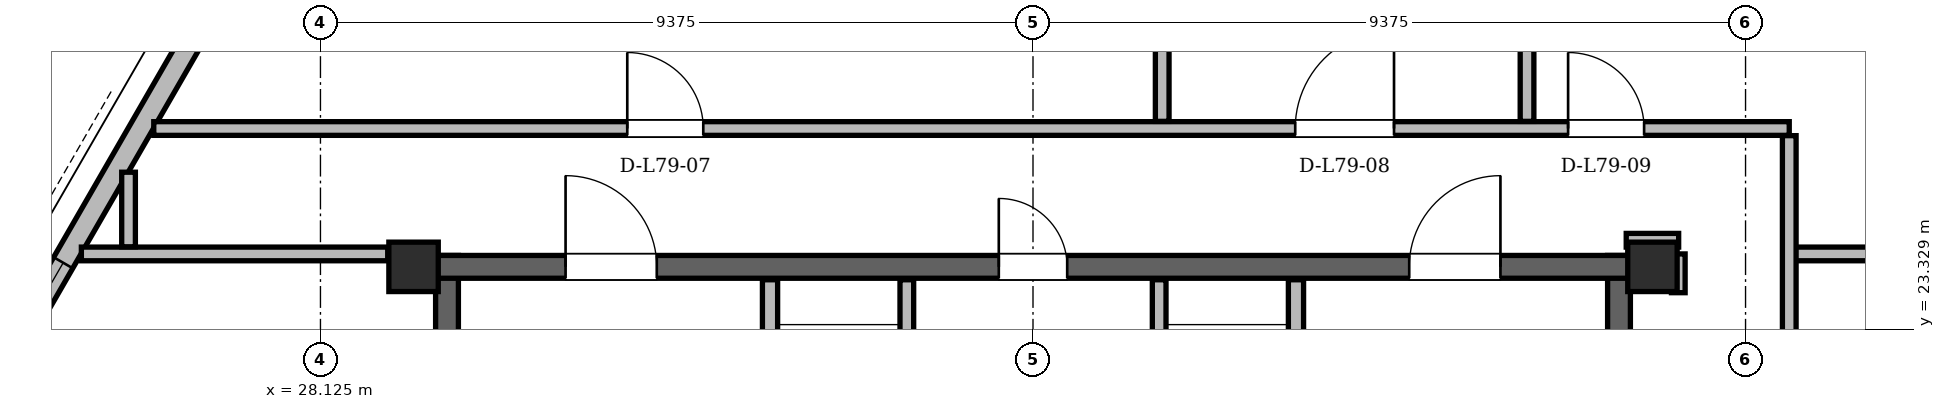
"""IFC4 building model, lengths in metres.
Left out: names, types, materials, properties, quantities, classifications, styles, units other than length and angle.
Written with IfcOpenShell. Run it as: python <this file> out.ifc"""

import sys

from ifc_helpers import new_model, si_unit, direction, frame, frame_2d, origin, origin_2d, place, context, subcontext, project, spatial, rectangle, hollow_rectangle, extrude, element, fill, save


model = new_model("IFC4")
c1 = context("Model", 3, precision=1e-05, world=origin(), true_north=direction((0.0, 1.0)))
c2 = subcontext(c1, "Body", "Model", "MODEL_VIEW")
j1 = project(units=[si_unit("LENGTHUNIT", "METRE"), si_unit("PLANEANGLEUNIT", "RADIAN")], contexts=[c1])
p1 = place(None, origin())
s1 = spatial("IfcSite", under=j1, at=p1, CompositionType="ELEMENT")
p2 = place(p1, origin())
s2 = spatial("IfcBuilding", under=s1, at=p2, CompositionType="ELEMENT")
p3 = place(p2, frame((0.0, 0.0, 301.2)))
s3 = spatial("IfcBuildingStorey", under=s2, at=p3, CompositionType="ELEMENT", Elevation=301.2)
for number, where, z_axis, x_axis in (
    (1, (45.65, 24.15, 0.0), (0.0, 0.0, 1.0), (1.0, 0.0, 0.0)),
    (2, (29.35, 24.15, 0.0), (0.0, 0.0, 1.0), (1.0, 0.0, 0.0)),
):
    element("IfcColumn", number, at=place(p3, frame(where, z_axis=z_axis, x_axis=x_axis)), inside=s3, PredefinedType="COLUMN", context=c2, shape_type="SweptSolid", body=[
        extrude(hollow_rectangle(XDim=0.65, YDim=0.65, WallThickness=0.05, at=origin_2d()), origin(), (0.0, 0.0, 1.0), 3.9),
    ])
for number, where, z_axis, x_axis in (
    (3, (29.79, 11.0, 0.0), (0.0, 0.0, 1.0), (0.0, 1.0, 0.0)),
    (4, (45.21, 11.0, 0.0), (0.0, 0.0, 1.0), (0.0, 1.0, 0.0)),
):
    element("IfcWall", number, at=place(p3, frame(where, z_axis=z_axis, x_axis=x_axis)), inside=s3, PredefinedType="SHEAR", context=c2, shape_type="SweptSolid", body=[
        extrude(rectangle(XDim=13.3, YDim=0.3, at=frame_2d((6.65, 0.0))), origin(), (0.0, 0.0, 1.0), 3.68),
    ])
p4 = place(p3, frame((29.65, 24.15, 0.0), z_axis=(0.0, 0.0, 1.0), x_axis=(1.0, 0.0, 0.0)))
e5 = element("IfcWall", 5, at=p4, inside=s3, PredefinedType="SHEAR", context=c2, shape_type="SweptSolid", body=[
    extrude(rectangle(XDim=15.7, YDim=0.3, at=frame_2d((7.85, 0.0))), origin(), (0.0, 0.0, 1.0), 3.68),
])
p5 = place(p4, frame((1.7, 0.0, 0.0)))
e6 = element("IfcOpeningElement", 6, at=p5, cuts=e5, PredefinedType="OPENING", context=c2, shape_type="SweptSolid", body=[
    extrude(rectangle(XDim=1.2, YDim=2.2, at=frame_2d((0.6, 1.1))), frame((0.0, 0.15, 0.0), z_axis=(0.0, -1.0, 0.0), x_axis=(1.0, 0.0, 0.0)), (0.0, 0.0, 1.0), 0.3),
])
p6 = place(p4, frame((12.8, 0.0, 0.0)))
e7 = element("IfcOpeningElement", 7, at=p6, cuts=e5, PredefinedType="OPENING", context=c2, shape_type="SweptSolid", body=[
    extrude(rectangle(XDim=1.2, YDim=2.2, at=frame_2d((0.6, 1.1))), frame((0.0, 0.15, 0.0), z_axis=(0.0, -1.0, 0.0), x_axis=(1.0, 0.0, 0.0)), (0.0, 0.0, 1.0), 0.3),
])
p7 = place(p4, frame((7.4, 0.0, 0.0)))
e8 = element("IfcOpeningElement", 8, at=p7, cuts=e5, PredefinedType="OPENING", context=c2, shape_type="SweptSolid", body=[
    extrude(rectangle(XDim=0.9, YDim=2.05, at=frame_2d((0.45, 1.025))), frame((0.0, 0.15, 0.0), z_axis=(0.0, -1.0, 0.0), x_axis=(1.0, 0.0, 0.0)), (0.0, 0.0, 1.0), 0.3),
])
p8 = place(p3, frame((58.261, 10.345, 0.0), z_axis=(0.0, 0.0, 1.0), x_axis=(-0.499999872078, 0.86602547764, 0.0)))
e9 = element("IfcWall", 9, at=p8, inside=s3, PredefinedType="SOLIDWALL", context=c2, shape_type="SweptSolid", body=[
    extrude(rectangle(XDim=37.658, YDim=0.29, at=frame_2d((18.829, 0.0))), origin(), (0.0, 0.0, 1.0), 3.058),
])
p9 = place(p8, frame((8.034, 0.0, 0.0)))
e10 = element("IfcOpeningElement", 10, at=p9, cuts=e9, PredefinedType="OPENING", context=c2, shape_type="SweptSolid", body=[
    extrude(rectangle(XDim=1.5, YDim=2.2, at=frame_2d((0.75, 1.1))), frame((0.0, 0.145, 0.0), z_axis=(0.0, -1.0, 0.0), x_axis=(1.0, 0.0, 0.0)), (0.0, 0.0, 1.0), 0.29),
])
p10 = place(p8, frame((32.618, 0.0, 0.0)))
e11 = element("IfcOpeningElement", 11, at=p10, cuts=e9, PredefinedType="OPENING", context=c2, shape_type="SweptSolid", body=[
    extrude(rectangle(XDim=1.3, YDim=2.2, at=frame_2d((0.65, 1.1))), frame((0.0, 0.145, 0.0), z_axis=(0.0, -1.0, 0.0), x_axis=(1.0, 0.0, 0.0)), (0.0, 0.0, 1.0), 0.29),
])
p11 = place(p8, frame((1.003, 0.0, 0.85)))
e12 = element("IfcOpeningElement", 12, at=p11, cuts=e9, PredefinedType="OPENING", context=c2, shape_type="SweptSolid", body=[
    extrude(rectangle(XDim=1.2, YDim=1.48, at=frame_2d((0.6, 0.74))), frame((0.0, 0.145, 0.0), z_axis=(0.0, -1.0, 0.0), x_axis=(1.0, 0.0, 0.0)), (0.0, 0.0, 1.0), 0.29),
])
p12 = place(p8, frame((13.352, 0.0, 0.85)))
e13 = element("IfcOpeningElement", 13, at=p12, cuts=e9, PredefinedType="OPENING", context=c2, shape_type="SweptSolid", body=[
    extrude(rectangle(XDim=1.6, YDim=1.7, at=frame_2d((0.8, 0.85))), frame((0.0, 0.145, 0.0), z_axis=(0.0, -1.0, 0.0), x_axis=(1.0, 0.0, 0.0)), (0.0, 0.0, 1.0), 0.29),
])
p13 = place(p8, frame((35.063, 0.0, 0.85)))
e14 = element("IfcOpeningElement", 14, at=p13, cuts=e9, PredefinedType="OPENING", context=c2, shape_type="SweptSolid", body=[
    extrude(rectangle(XDim=1.2, YDim=1.48, at=frame_2d((0.6, 0.74))), frame((0.0, 0.145, 0.0), z_axis=(0.0, -1.0, 0.0), x_axis=(1.0, 0.0, 0.0)), (0.0, 0.0, 1.0), 0.29),
])
p14 = place(p8, frame((18.559, 0.0, 0.85)))
e15 = element("IfcOpeningElement", 15, at=p14, cuts=e9, PredefinedType="OPENING", context=c2, shape_type="SweptSolid", body=[
    extrude(rectangle(XDim=3.0, YDim=2.098, at=frame_2d((1.5, 1.049))), frame((0.0, 0.145, 0.0), z_axis=(0.0, -1.0, 0.0), x_axis=(1.0, 0.0, 0.0)), (0.0, 0.0, 1.0), 0.29),
])
p15 = place(p8, frame((24.514, 0.0, 0.85)))
e16 = element("IfcOpeningElement", 16, at=p15, cuts=e9, PredefinedType="OPENING", context=c2, shape_type="SweptSolid", body=[
    extrude(rectangle(XDim=1.2, YDim=1.48, at=frame_2d((0.6, 0.74))), frame((0.0, 0.145, 0.0), z_axis=(0.0, -1.0, 0.0), x_axis=(1.0, 0.0, 0.0)), (0.0, 0.0, 1.0), 0.29),
])
p16 = place(p8, frame((29.78, 0.0, 0.85)))
e17 = element("IfcOpeningElement", 17, at=p16, cuts=e9, PredefinedType="OPENING", context=c2, shape_type="SweptSolid", body=[
    extrude(rectangle(XDim=1.2, YDim=1.48, at=frame_2d((0.6, 0.74))), frame((0.0, 0.145, 0.0), z_axis=(0.0, -1.0, 0.0), x_axis=(1.0, 0.0, 0.0)), (0.0, 0.0, 1.0), 0.29),
])
p17 = place(p3, frame((35.568, 42.958, 0.0), z_axis=(0.0, 0.0, 1.0), x_axis=(-0.499999872078, -0.86602547764, 0.0)))
e18 = element("IfcWall", 18, at=p17, inside=s3, PredefinedType="SOLIDWALL", context=c2, shape_type="SweptSolid", body=[
    extrude(rectangle(XDim=37.658, YDim=0.29, at=frame_2d((18.829, 0.0))), origin(), (0.0, 0.0, 1.0), 3.058),
])
p18 = place(p17, frame((8.034, 0.0, 0.0)))
e19 = element("IfcOpeningElement", 19, at=p18, cuts=e18, PredefinedType="OPENING", context=c2, shape_type="SweptSolid", body=[
    extrude(rectangle(XDim=1.5, YDim=2.2, at=frame_2d((0.75, 1.1))), frame((0.0, 0.145, 0.0), z_axis=(0.0, -1.0, 0.0), x_axis=(1.0, 0.0, 0.0)), (0.0, 0.0, 1.0), 0.29),
])
p19 = place(p17, frame((32.518, 0.0, 0.0)))
e20 = element("IfcOpeningElement", 20, at=p19, cuts=e18, PredefinedType="OPENING", context=c2, shape_type="SweptSolid", body=[
    extrude(rectangle(XDim=1.5, YDim=2.2, at=frame_2d((0.75, 1.1))), frame((0.0, 0.145, 0.0), z_axis=(0.0, -1.0, 0.0), x_axis=(1.0, 0.0, 0.0)), (0.0, 0.0, 1.0), 0.29),
])
p20 = place(p17, frame((27.303, 0.0, 0.85)))
e21 = element("IfcOpeningElement", 21, at=p20, cuts=e18, PredefinedType="OPENING", context=c2, shape_type="SweptSolid", body=[
    extrude(rectangle(XDim=2.2, YDim=1.85, at=frame_2d((1.1, 0.925))), frame((0.0, 0.145, 0.0), z_axis=(0.0, -1.0, 0.0), x_axis=(1.0, 0.0, 0.0)), (0.0, 0.0, 1.0), 0.29),
])
p21 = place(p17, frame((34.437, 0.0, 0.85)))
e22 = element("IfcOpeningElement", 22, at=p21, cuts=e18, PredefinedType="OPENING", context=c2, shape_type="SweptSolid", body=[
    extrude(rectangle(XDim=1.6, YDim=1.7, at=frame_2d((0.8, 0.85))), frame((0.0, 0.145, 0.0), z_axis=(0.0, -1.0, 0.0), x_axis=(1.0, 0.0, 0.0)), (0.0, 0.0, 1.0), 0.29),
])
p22 = place(p17, frame((21.655, 0.0, 0.85)))
e23 = element("IfcOpeningElement", 23, at=p22, cuts=e18, PredefinedType="OPENING", context=c2, shape_type="SweptSolid", body=[
    extrude(rectangle(XDim=1.2, YDim=1.48, at=frame_2d((0.6, 0.74))), frame((0.0, 0.145, 0.0), z_axis=(0.0, -1.0, 0.0), x_axis=(1.0, 0.0, 0.0)), (0.0, 0.0, 1.0), 0.29),
])
p23 = place(p17, frame((23.901, 0.0, 0.85)))
e24 = element("IfcOpeningElement", 24, at=p23, cuts=e18, PredefinedType="OPENING", context=c2, shape_type="SweptSolid", body=[
    extrude(rectangle(XDim=1.4, YDim=1.6, at=frame_2d((0.7, 0.8))), frame((0.0, 0.145, 0.0), z_axis=(0.0, -1.0, 0.0), x_axis=(1.0, 0.0, 0.0)), (0.0, 0.0, 1.0), 0.29),
])
p24 = place(p17, frame((15.246, 0.0, 0.85)))
e25 = element("IfcOpeningElement", 25, at=p24, cuts=e18, PredefinedType="OPENING", context=c2, shape_type="SweptSolid", body=[
    extrude(rectangle(XDim=2.6, YDim=1.95, at=frame_2d((1.3, 0.975))), frame((0.0, 0.145, 0.0), z_axis=(0.0, -1.0, 0.0), x_axis=(1.0, 0.0, 0.0)), (0.0, 0.0, 1.0), 0.29),
])
p25 = place(p17, frame((1.164, 0.0, 0.85)))
e26 = element("IfcOpeningElement", 26, at=p25, cuts=e18, PredefinedType="OPENING", context=c2, shape_type="SweptSolid", body=[
    extrude(rectangle(XDim=1.2, YDim=1.48, at=frame_2d((0.6, 0.74))), frame((0.0, 0.145, 0.0), z_axis=(0.0, -1.0, 0.0), x_axis=(1.0, 0.0, 0.0)), (0.0, 0.0, 1.0), 0.29),
])
p26 = place(p3, frame((34.04, 19.48, 0.0), z_axis=(0.0, 0.0, 1.0), x_axis=(0.0, 1.0, 0.0)))
e27 = element("IfcWall", 27, at=p26, inside=s3, PredefinedType="PARTITIONING", context=c2, shape_type="SweptSolid", body=[
    extrude(rectangle(XDim=4.5, YDim=0.2, at=frame_2d((2.25, 0.0))), origin(), (0.0, 0.0, 1.0), 3.68),
])
p27 = place(p26, frame((2.12, 0.0, 0.0)))
e28 = element("IfcOpeningElement", 28, at=p27, cuts=e27, PredefinedType="OPENING", context=c2, shape_type="SweptSolid", body=[
    extrude(rectangle(XDim=1.1, YDim=2.2, at=frame_2d((0.55, 1.1))), frame((0.0, 0.1, 0.0), z_axis=(0.0, -1.0, 0.0), x_axis=(1.0, 0.0, 0.0)), (0.0, 0.0, 1.0), 0.2),
])
p28 = place(p3, frame((35.84, 20.96, 0.0), z_axis=(0.0, 0.0, 1.0), x_axis=(0.0, 1.0, 0.0)))
e29 = element("IfcWall", 29, at=p28, inside=s3, PredefinedType="PARTITIONING", context=c2, shape_type="SweptSolid", body=[
    extrude(rectangle(XDim=3.02, YDim=0.18, at=frame_2d((1.51, 0.0))), origin(), (0.0, 0.0, 1.0), 3.68),
])
p29 = place(p3, frame((40.96, 19.48, 0.0), z_axis=(0.0, 0.0, 1.0), x_axis=(0.0, 1.0, 0.0)))
e30 = element("IfcWall", 30, at=p29, inside=s3, PredefinedType="PARTITIONING", context=c2, shape_type="SweptSolid", body=[
    extrude(rectangle(XDim=4.5, YDim=0.2, at=frame_2d((2.25, 0.0))), origin(), (0.0, 0.0, 1.0), 3.68),
])
p30 = place(p29, frame((2.12, 0.0, 0.0)))
e31 = element("IfcOpeningElement", 31, at=p30, cuts=e30, PredefinedType="OPENING", context=c2, shape_type="SweptSolid", body=[
    extrude(rectangle(XDim=1.1, YDim=2.2, at=frame_2d((0.55, 1.1))), frame((0.0, 0.1, 0.0), z_axis=(0.0, -1.0, 0.0), x_axis=(1.0, 0.0, 0.0)), (0.0, 0.0, 1.0), 0.2),
])
p31 = place(p3, frame((39.16, 20.96, 0.0), z_axis=(0.0, 0.0, 1.0), x_axis=(0.0, 1.0, 0.0)))
e32 = element("IfcWall", 32, at=p31, inside=s3, PredefinedType="PARTITIONING", context=c2, shape_type="SweptSolid", body=[
    extrude(rectangle(XDim=3.02, YDim=0.18, at=frame_2d((1.51, 0.0))), origin(), (0.0, 0.0, 1.0), 3.68),
])
p32 = place(p3, frame((24.979, 24.32, 0.0), z_axis=(0.0, 0.0, 1.0), x_axis=(1.0, 0.0, 0.0)))
e33 = element("IfcWall", 33, at=p32, inside=s3, PredefinedType="PARTITIONING", context=c2, shape_type="SweptSolid", body=[
    extrude(rectangle(XDim=4.031, YDim=0.18, at=frame_2d((2.015, 0.0))), origin(), (0.0, 0.0, 1.0), 3.68),
])
p33 = place(p3, frame((47.45, 24.32, 0.0), z_axis=(0.0, 0.0, 1.0), x_axis=(1.0, 0.0, 0.0)))
e34 = element("IfcWall", 34, at=p33, inside=s3, PredefinedType="PARTITIONING", context=c2, shape_type="SweptSolid", body=[
    extrude(rectangle(XDim=2.571, YDim=0.18, at=frame_2d((1.285, 0.0))), origin(), (0.0, 0.0, 1.0), 3.68),
])
p34 = place(p3, frame((45.305, 24.5, 0.0), z_axis=(0.0, 0.0, 1.0), x_axis=(1.0, 0.0, 0.0)))
e35 = element("IfcWall", 35, at=p34, inside=s3, PredefinedType="PARTITIONING", context=c2, shape_type="SweptSolid", body=[
    extrude(rectangle(XDim=0.69, YDim=0.18, at=frame_2d((0.345, 0.0))), origin(), (0.0, 0.0, 1.0), 3.058),
])
p35 = place(p3, frame((25.932, 25.97, 0.0), z_axis=(0.0, 0.0, 1.0), x_axis=(1.0, 0.0, 0.0)))
e36 = element("IfcWall", 36, at=p35, inside=s3, PredefinedType="PARTITIONING", context=c2, shape_type="SweptSolid", body=[
    extrude(rectangle(XDim=21.518, YDim=0.18, at=frame_2d((10.759, 0.0))), origin(), (0.0, 0.0, 1.0), 3.058),
])
p36 = place(p35, frame((6.23, 0.0, 0.0)))
e37 = element("IfcOpeningElement", 37, at=p36, cuts=e36, PredefinedType="OPENING", context=c2, shape_type="SweptSolid", body=[
    extrude(rectangle(XDim=1.0, YDim=2.18, at=frame_2d((0.5, 1.09))), frame((0.0, 0.09, 0.0), z_axis=(0.0, -1.0, 0.0), x_axis=(1.0, 0.0, 0.0)), (0.0, 0.0, 1.0), 0.18),
])
p37 = place(p35, frame((15.018, 0.0, 0.0)))
e38 = element("IfcOpeningElement", 38, at=p37, cuts=e36, PredefinedType="OPENING", context=c2, shape_type="SweptSolid", body=[
    extrude(rectangle(XDim=1.3, YDim=2.2, at=frame_2d((0.65, 1.1))), frame((0.0, 0.09, 0.0), z_axis=(0.0, -1.0, 0.0), x_axis=(1.0, 0.0, 0.0)), (0.0, 0.0, 1.0), 0.18),
])
p38 = place(p35, frame((18.608, 0.0, 0.0)))
e39 = element("IfcOpeningElement", 39, at=p38, cuts=e36, PredefinedType="OPENING", context=c2, shape_type="SweptSolid", body=[
    extrude(rectangle(XDim=1.0, YDim=2.18, at=frame_2d((0.5, 1.09))), frame((0.0, 0.09, 0.0), z_axis=(0.0, -1.0, 0.0), x_axis=(1.0, 0.0, 0.0)), (0.0, 0.0, 1.0), 0.18),
])
p39 = place(p3, frame((25.6, 24.414, 0.0), z_axis=(0.0, 0.0, 1.0), x_axis=(0.0, 1.0, 0.0)))
e40 = element("IfcWall", 40, at=p39, inside=s3, PredefinedType="PARTITIONING", context=c2, shape_type="SweptSolid", body=[
    extrude(rectangle(XDim=0.981, YDim=0.18, at=frame_2d((0.49, 0.0))), origin(), (0.0, 0.0, 1.0), 3.058),
])
for number, where, z_axis, x_axis in (
    (41, (39.2, 26.064, 0.0), (0.0, 0.0, 1.0), (0.0, 1.0, 0.0)),
    (42, (44.0, 26.064, 0.0), (0.0, 0.0, 1.0), (0.0, 1.0, 0.0)),
):
    element("IfcWall", number, at=place(p3, frame(where, z_axis=z_axis, x_axis=x_axis)), inside=s3, PredefinedType="PARTITIONING", context=c2, shape_type="SweptSolid", body=[
        extrude(rectangle(XDim=4.312, YDim=0.18, at=frame_2d((2.156, 0.0))), origin(), (0.0, 0.0, 1.0), 3.142),
    ])
p40 = place(p3, frame((45.99, 23.81, 0.0), z_axis=(0.0, 0.0, 1.0), x_axis=(0.0, 1.0, 0.0)))
e43 = element("IfcWall", 43, at=p40, inside=s3, PredefinedType="PARTITIONING", context=c2, shape_type="SweptSolid", body=[
    extrude(rectangle(XDim=0.51, YDim=0.18, at=frame_2d((0.255, 0.0))), origin(), (0.0, 0.0, 1.0), 3.68),
])
p41 = place(p3, frame((47.45, 9.394, 0.0), z_axis=(0.0, 0.0, 1.0), x_axis=(0.0, 1.0, 0.0)))
e44 = element("IfcWall", 44, at=p41, inside=s3, PredefinedType="PARTITIONING", context=c2, shape_type="SweptSolid", body=[
    extrude(rectangle(XDim=16.482, YDim=0.18, at=frame_2d((8.241, 0.0))), origin(), (0.0, 0.0, 1.0), 3.266),
])
p42 = place(p41, frame((9.343, 0.0, 0.0)))
e45 = element("IfcOpeningElement", 45, at=p42, cuts=e44, PredefinedType="OPENING", context=c2, shape_type="SweptSolid", body=[
    extrude(rectangle(XDim=1.0, YDim=2.18, at=frame_2d((0.5, 1.09))), frame((0.0, 0.09, 0.0), z_axis=(0.0, -1.0, 0.0), x_axis=(1.0, 0.0, 0.0)), (0.0, 0.0, 1.0), 0.18),
])
p43 = place(p14, origin())
e46 = element("IfcWindow", 46, at=p43, inside=s3, PartitioningType="SINGLE_PANEL", PredefinedType="WINDOW", context=c2, shape_type="SweptSolid", body=[
    extrude(rectangle(XDim=3.0, YDim=2.098, at=frame_2d((1.5, 1.049))), frame((0.0, 0.03, 0.0), z_axis=(0.0, -1.0, 0.0), x_axis=(1.0, 0.0, 0.0)), (0.0, 0.0, 1.0), 0.06),
])
fill(e15, e46)
p44 = place(p22, origin())
e47 = element("IfcWindow", 47, at=p44, inside=s3, PartitioningType="SINGLE_PANEL", PredefinedType="WINDOW", context=c2, shape_type="SweptSolid", body=[
    extrude(rectangle(XDim=1.2, YDim=1.48, at=frame_2d((0.6, 0.74))), frame((0.0, 0.03, 0.0), z_axis=(0.0, -1.0, 0.0), x_axis=(1.0, 0.0, 0.0)), (0.0, 0.0, 1.0), 0.06),
])
fill(e23, e47)
p45 = place(p5, origin())
e48 = element("IfcDoor", 48, at=p45, inside=s3, OperationType="SINGLE_SWING_LEFT", PredefinedType="DOOR", context=c2, shape_type="SweptSolid", body=[
    extrude(rectangle(XDim=1.2, YDim=2.2, at=frame_2d((0.6, 1.1))), frame((0.0, 0.025, 0.0), z_axis=(0.0, -1.0, 0.0), x_axis=(1.0, 0.0, 0.0)), (0.0, 0.0, 1.0), 0.05),
])
fill(e6, e48)
p46 = place(p6, origin())
e49 = element("IfcDoor", 49, at=p46, inside=s3, OperationType="SINGLE_SWING_RIGHT", PredefinedType="DOOR", context=c2, shape_type="SweptSolid", body=[
    extrude(rectangle(XDim=1.2, YDim=2.2, at=frame_2d((0.6, 1.1))), frame((0.0, 0.025, 0.0), z_axis=(0.0, -1.0, 0.0), x_axis=(1.0, 0.0, 0.0)), (0.0, 0.0, 1.0), 0.05),
])
fill(e7, e49)
p47 = place(p7, origin())
e50 = element("IfcDoor", 50, at=p47, inside=s3, OperationType="SINGLE_SWING_LEFT", PredefinedType="DOOR", context=c2, shape_type="SweptSolid", body=[
    extrude(rectangle(XDim=0.9, YDim=2.05, at=frame_2d((0.45, 1.025))), frame((0.0, 0.025, 0.0), z_axis=(0.0, -1.0, 0.0), x_axis=(1.0, 0.0, 0.0)), (0.0, 0.0, 1.0), 0.05),
])
fill(e8, e50)
p48 = place(p36, origin())
e51 = element("IfcDoor", 51, at=p48, inside=s3, OperationType="SINGLE_SWING_LEFT", PredefinedType="DOOR", context=c2, shape_type="SweptSolid", body=[
    extrude(rectangle(XDim=1.0, YDim=2.18, at=frame_2d((0.5, 1.09))), frame((0.0, 0.025, 0.0), z_axis=(0.0, -1.0, 0.0), x_axis=(1.0, 0.0, 0.0)), (0.0, 0.0, 1.0), 0.05),
])
fill(e37, e51)
p49 = place(p37, origin())
e52 = element("IfcDoor", 52, at=p49, inside=s3, OperationType="SINGLE_SWING_RIGHT", PredefinedType="DOOR", context=c2, shape_type="SweptSolid", body=[
    extrude(rectangle(XDim=1.3, YDim=2.2, at=frame_2d((0.65, 1.1))), frame((0.0, 0.025, 0.0), z_axis=(0.0, -1.0, 0.0), x_axis=(1.0, 0.0, 0.0)), (0.0, 0.0, 1.0), 0.05),
])
fill(e38, e52)
p50 = place(p38, origin())
e53 = element("IfcDoor", 53, at=p50, inside=s3, OperationType="SINGLE_SWING_LEFT", PredefinedType="DOOR", context=c2, shape_type="SweptSolid", body=[
    extrude(rectangle(XDim=1.0, YDim=2.18, at=frame_2d((0.5, 1.09))), frame((0.0, 0.025, 0.0), z_axis=(0.0, -1.0, 0.0), x_axis=(1.0, 0.0, 0.0)), (0.0, 0.0, 1.0), 0.05),
])
fill(e39, e53)
save(model, sys.argv[1])
